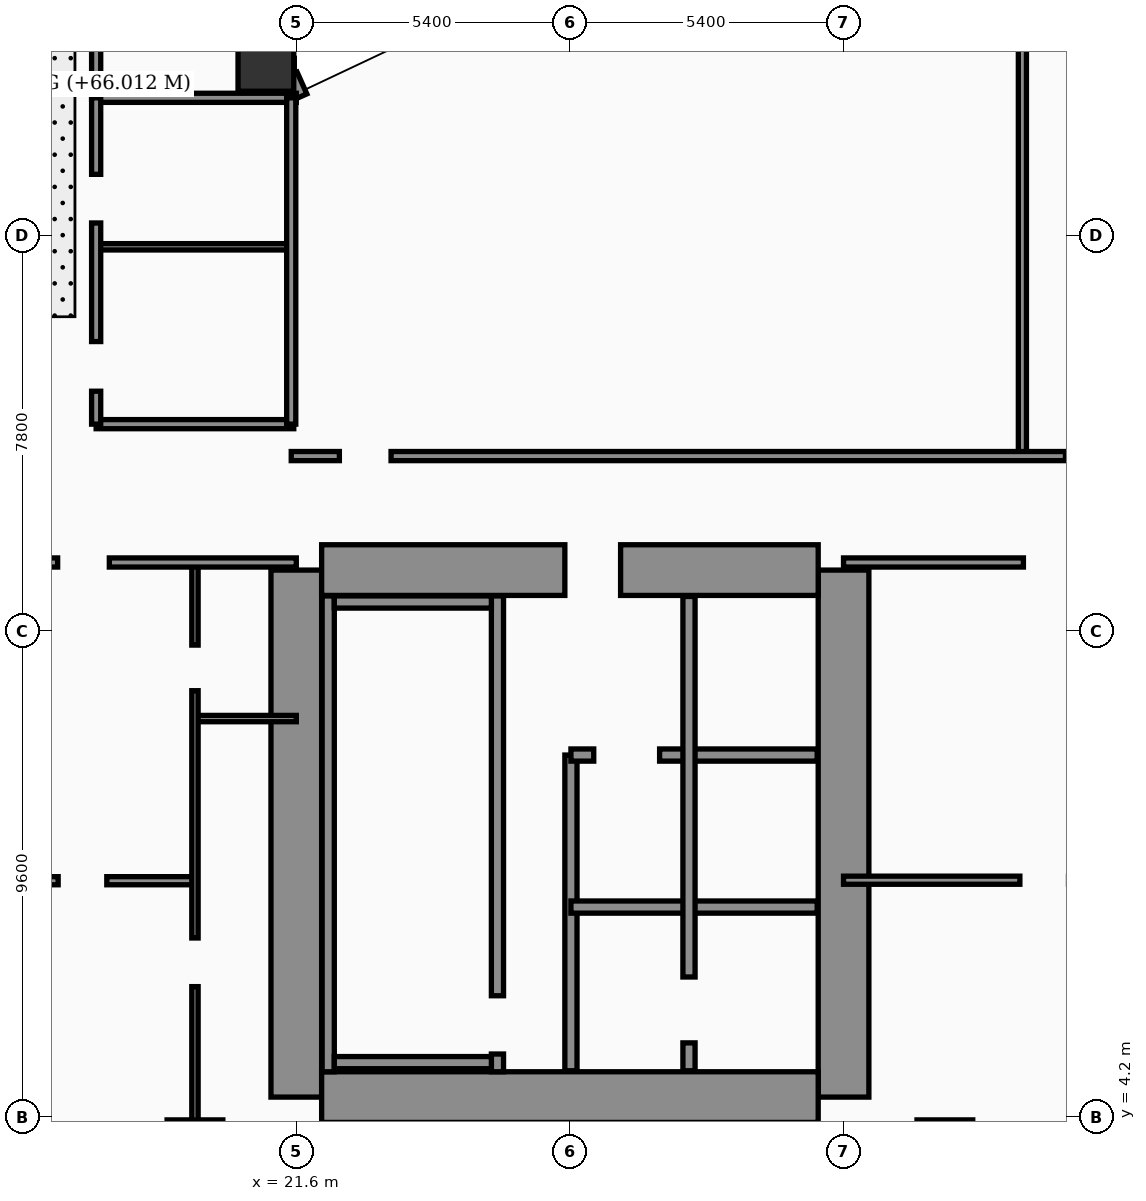
"""IFC4 building model, lengths in metres.
Left out: names, types, materials, properties, quantities, classifications, styles, units other than length and angle.
Written with IfcOpenShell. Run it as: python <this file> out.ifc"""

import sys

from ifc_helpers import new_model, si_unit, direction, frame, frame_2d, origin, origin_2d, place, context, subcontext, project, spatial, rectangle, hollow_rectangle, extrude, element, fill, save


model = new_model("IFC4")
c1 = context("Model", 3, precision=1e-05, world=origin(), true_north=direction((0.0, 1.0)))
c2 = subcontext(c1, "Body", "Model", "MODEL_VIEW")
j1 = project(units=[si_unit("LENGTHUNIT", "METRE"), si_unit("PLANEANGLEUNIT", "RADIAN")], contexts=[c1])
p1 = place(None, origin())
s1 = spatial("IfcSite", under=j1, at=p1, CompositionType="ELEMENT")
p2 = place(p1, origin())
s2 = spatial("IfcBuilding", under=s1, at=p2, CompositionType="ELEMENT")
p3 = place(p2, frame((0.0, 0.0, 66.0)))
s3 = spatial("IfcBuildingStorey", under=s2, at=p3, CompositionType="ELEMENT", Elevation=66.0)
for number, where, z_axis, x_axis in (
    (1, (21.6, 4.6, 0.0), (0.0, 0.0, 1.0), (0.0, 1.0, 0.0)),
    (2, (32.4, 4.6, 0.0), (0.0, 0.0, 1.0), (0.0, 1.0, 0.0)),
):
    element("IfcWall", number, at=place(p3, frame(where, z_axis=z_axis, x_axis=x_axis)), inside=s3, PredefinedType="SHEAR", context=c2, shape_type="SweptSolid", body=[
        extrude(rectangle(XDim=10.4, YDim=1.0, at=frame_2d((5.2, 0.0))), origin(), (0.0, 0.0, 1.0), 3.56),
    ])
p4 = place(p3, frame((22.1, 15.0, 0.0), z_axis=(0.0, 0.0, 1.0), x_axis=(1.0, 0.0, 0.0)))
e3 = element("IfcWall", 3, at=p4, inside=s3, PredefinedType="SHEAR", context=c2, shape_type="SweptSolid", body=[
    extrude(rectangle(XDim=9.8, YDim=1.0, at=frame_2d((4.9, 0.0))), origin(), (0.0, 0.0, 1.0), 3.56),
])
p5 = place(p4, frame((4.8, 0.0, 0.0)))
e4 = element("IfcOpeningElement", 4, at=p5, cuts=e3, PredefinedType="OPENING", context=c2, shape_type="SweptSolid", body=[
    extrude(rectangle(XDim=1.1, YDim=2.2, at=frame_2d((0.55, 1.1))), frame((0.0, 0.51, 0.0), z_axis=(0.0, -1.0, 0.0), x_axis=(1.0, 0.0, 0.0)), (0.0, 0.0, 1.0), 1.02),
])
p6 = place(p3, frame((22.1, 4.6, 0.0), z_axis=(0.0, 0.0, 1.0), x_axis=(1.0, 0.0, 0.0)))
e5 = element("IfcWall", 5, at=p6, inside=s3, PredefinedType="SHEAR", context=c2, shape_type="SweptSolid", body=[
    extrude(rectangle(XDim=9.8, YDim=1.0, at=frame_2d((4.9, 0.0))), origin(), (0.0, 0.0, 1.0), 3.56),
])
p7 = place(p3, frame((22.23, 5.1, 0.0), z_axis=(0.0, 0.0, 1.0), x_axis=(0.0, 1.0, 0.0)))
e6 = element("IfcWall", 6, at=p7, inside=s3, PredefinedType="SOLIDWALL", context=c2, shape_type="SweptSolid", body=[
    extrude(rectangle(XDim=9.39, YDim=0.24, at=frame_2d((4.695, 0.0))), origin(), (0.0, 0.0, 1.0), 3.56),
])
p8 = place(p3, frame((25.57, 5.1, 0.0), z_axis=(0.0, 0.0, 1.0), x_axis=(0.0, 1.0, 0.0)))
e7 = element("IfcWall", 7, at=p8, inside=s3, PredefinedType="SOLIDWALL", context=c2, shape_type="SweptSolid", body=[
    extrude(rectangle(XDim=9.39, YDim=0.24, at=frame_2d((4.695, 0.0))), origin(), (0.0, 0.0, 1.0), 3.56),
])
p9 = place(p8, frame((0.35, 0.0, 0.0)))
e8 = element("IfcOpeningElement", 8, at=p9, cuts=e7, PredefinedType="OPENING", context=c2, shape_type="SweptSolid", body=[
    extrude(rectangle(XDim=1.15, YDim=2.2, at=frame_2d((0.575, 1.1))), frame((0.0, 0.13, 0.0), z_axis=(0.0, -1.0, 0.0), x_axis=(1.0, 0.0, 0.0)), (0.0, 0.0, 1.0), 0.26),
])
for number, where, z_axis, x_axis in (
    (9, (22.35, 5.28, 0.0), (0.0, 0.0, 1.0), (1.0, 0.0, 0.0)),
    (10, (22.35, 14.37, 0.0), (0.0, 0.0, 1.0), (1.0, 0.0, 0.0)),
):
    element("IfcWall", number, at=place(p3, frame(where, z_axis=z_axis, x_axis=x_axis)), inside=s3, PredefinedType="SOLIDWALL", context=c2, shape_type="SweptSolid", body=[
        extrude(rectangle(XDim=3.1, YDim=0.24, at=frame_2d((1.55, 0.0))), origin(), (0.0, 0.0, 1.0), 3.56),
    ])
for number, where, z_axis, x_axis in (
    (11, (21.0, 25.0, 0.0), (0.0, 0.0, 1.0), (1.0, 0.0, 0.0)),
    (12, (19.6, 3.6, 0.0), (0.0, 0.0, 1.0), (1.0, 0.0, 0.0)),
    (13, (34.4, 3.6, 0.0), (0.0, 0.0, 1.0), (1.0, 0.0, 0.0)),
):
    element("IfcColumn", number, at=place(p3, frame(where, z_axis=z_axis, x_axis=x_axis)), inside=s3, PredefinedType="COLUMN", context=c2, shape_type="SweptSolid", body=[
        extrude(hollow_rectangle(XDim=1.1, YDim=1.1, WallThickness=0.045, at=origin_2d()), origin(), (0.0, 0.0, 1.0), 3.56),
    ])
p10 = place(p3, frame((21.68, 24.34, 0.0), z_axis=(0.0, 0.0, 1.0), x_axis=(-0.40758134973, 0.913168901875, 0.0)))
e14 = element("IfcWall", 14, at=p10, inside=s3, PredefinedType="SOLIDWALL", context=c2, shape_type="SweptSolid", body=[
    extrude(rectangle(XDim=0.471, YDim=0.28, at=frame_2d((0.235, 0.0))), origin(), (0.0, 0.0, 1.0), 3.56),
])
p11 = place(p3, frame((27.02, 5.12, 0.0), z_axis=(0.0, 0.0, 1.0), x_axis=(0.0, 1.0, 0.0)))
e15 = element("IfcWall", 15, at=p11, inside=s3, PredefinedType="SOLIDWALL", context=c2, shape_type="SweptSolid", body=[
    extrude(rectangle(XDim=6.23, YDim=0.24, at=frame_2d((3.115, 0.0))), origin(), (0.0, 0.0, 1.0), 3.56),
])
p12 = place(p3, frame((27.02, 11.35, 0.0), z_axis=(0.0, 0.0, 1.0), x_axis=(1.0, 0.0, 0.0)))
e16 = element("IfcWall", 16, at=p12, inside=s3, PredefinedType="SOLIDWALL", context=c2, shape_type="SweptSolid", body=[
    extrude(rectangle(XDim=4.86, YDim=0.24, at=frame_2d((2.43, 0.0))), origin(), (0.0, 0.0, 1.0), 3.56),
])
p13 = place(p12, frame((0.45, 0.0, 0.0)))
e17 = element("IfcOpeningElement", 17, at=p13, cuts=e16, PredefinedType="OPENING", context=c2, shape_type="SweptSolid", body=[
    extrude(rectangle(XDim=1.3, YDim=2.35, at=frame_2d((0.65, 1.175))), frame((0.0, 0.13, 0.0), z_axis=(0.0, -1.0, 0.0), x_axis=(1.0, 0.0, 0.0)), (0.0, 0.0, 1.0), 0.26),
])
p14 = place(p3, frame((27.02, 8.35, 0.0), z_axis=(0.0, 0.0, 1.0), x_axis=(1.0, 0.0, 0.0)))
e18 = element("IfcWall", 18, at=p14, inside=s3, PredefinedType="SOLIDWALL", context=c2, shape_type="SweptSolid", body=[
    extrude(rectangle(XDim=4.86, YDim=0.24, at=frame_2d((2.43, 0.0))), origin(), (0.0, 0.0, 1.0), 3.56),
])
p15 = place(p3, frame((29.35, 5.12, 0.0), z_axis=(0.0, 0.0, 1.0), x_axis=(0.0, 1.0, 0.0)))
e19 = element("IfcWall", 19, at=p15, inside=s3, PredefinedType="SOLIDWALL", context=c2, shape_type="SweptSolid", body=[
    extrude(rectangle(XDim=9.36, YDim=0.24, at=frame_2d((4.68, 0.0))), origin(), (0.0, 0.0, 1.0), 3.56),
])
p16 = place(p15, frame((0.55, 0.0, 0.0)))
e20 = element("IfcOpeningElement", 20, at=p16, cuts=e19, PredefinedType="OPENING", context=c2, shape_type="SweptSolid", body=[
    extrude(rectangle(XDim=1.3, YDim=2.35, at=frame_2d((0.65, 1.175))), frame((0.0, 0.13, 0.0), z_axis=(0.0, -1.0, 0.0), x_axis=(1.0, 0.0, 0.0)), (0.0, 0.0, 1.0), 0.26),
])
p17 = place(p3, frame((19.6, 12.07, 0.0), z_axis=(0.0, 0.0, 1.0), x_axis=(1.0, 0.0, 0.0)))
e21 = element("IfcWall", 21, at=p17, inside=s3, PredefinedType="PARTITIONING", context=c2, shape_type="SweptSolid", body=[
    extrude(rectangle(XDim=2.0, YDim=0.125, at=frame_2d((1.0, 0.0))), origin(), (0.0, 0.0, 1.0), 3.56),
])
p18 = place(p3, frame((15.15, 8.87, 0.0), z_axis=(0.0, 0.0, 1.0), x_axis=(1.0, 0.0, 0.0)))
e22 = element("IfcWall", 22, at=p18, inside=s3, PredefinedType="PARTITIONING", context=c2, shape_type="SweptSolid", body=[
    extrude(rectangle(XDim=4.45, YDim=0.16, at=frame_2d((2.225, 0.0))), origin(), (0.0, 0.0, 1.0), 3.56),
])
p19 = place(p18, frame((1.75, 0.0, 0.0)))
e23 = element("IfcOpeningElement", 23, at=p19, cuts=e22, PredefinedType="OPENING", context=c2, shape_type="SweptSolid", body=[
    extrude(rectangle(XDim=0.96, YDim=2.2, at=frame_2d((0.48, 1.1))), frame((0.0, 0.09, 0.0), z_axis=(0.0, -1.0, 0.0), x_axis=(1.0, 0.0, 0.0)), (0.0, 0.0, 1.0), 0.18),
])
p20 = place(p3, frame((19.6, 2.44, 0.0), z_axis=(0.0, 0.0, 1.0), x_axis=(0.0, 1.0, 0.0)))
e24 = element("IfcWall", 24, at=p20, inside=s3, PredefinedType="PARTITIONING", context=c2, shape_type="SweptSolid", body=[
    extrude(rectangle(XDim=12.71, YDim=0.125, at=frame_2d((6.355, 0.0))), origin(), (0.0, 0.0, 1.0), 2.34),
])
p21 = place(p20, frame((4.34, 0.0, 0.0)))
e25 = element("IfcOpeningElement", 25, at=p21, cuts=e24, PredefinedType="OPENING", context=c2, shape_type="SweptSolid", body=[
    extrude(rectangle(XDim=0.96, YDim=2.2, at=frame_2d((0.48, 1.1))), frame((0.0, 0.073, 0.0), z_axis=(0.0, -1.0, 0.0), x_axis=(1.0, 0.0, 0.0)), (0.0, 0.0, 1.0), 0.145),
])
p22 = place(p20, frame((10.18, 0.0, 0.0)))
e26 = element("IfcOpeningElement", 26, at=p22, cuts=e24, PredefinedType="OPENING", context=c2, shape_type="SweptSolid", body=[
    extrude(rectangle(XDim=0.9, YDim=2.15, at=frame_2d((0.45, 1.075))), frame((0.0, 0.073, 0.0), z_axis=(0.0, -1.0, 0.0), x_axis=(1.0, 0.0, 0.0)), (0.0, 0.0, 1.0), 0.145),
])
p23 = place(p3, frame((15.15, 15.15, 0.0), z_axis=(0.0, 0.0, 1.0), x_axis=(1.0, 0.0, 0.0)))
e27 = element("IfcWall", 27, at=p23, inside=s3, PredefinedType="PARTITIONING", context=c2, shape_type="SweptSolid", body=[
    extrude(rectangle(XDim=6.45, YDim=0.18, at=frame_2d((3.225, 0.0))), origin(), (0.0, 0.0, 1.0), 2.34),
])
p24 = place(p23, frame((1.74, 0.0, 0.0)))
e28 = element("IfcOpeningElement", 28, at=p24, cuts=e27, PredefinedType="OPENING", context=c2, shape_type="SweptSolid", body=[
    extrude(rectangle(XDim=1.02, YDim=2.2, at=frame_2d((0.51, 1.1))), frame((0.0, 0.1, 0.0), z_axis=(0.0, -1.0, 0.0), x_axis=(1.0, 0.0, 0.0)), (0.0, 0.0, 1.0), 0.2),
])
p25 = place(p3, frame((17.65, 24.3, 0.0), z_axis=(0.0, 0.0, 1.0), x_axis=(0.0, 1.0, 0.0)))
e29 = element("IfcWall", 29, at=p25, inside=s3, PredefinedType="PARTITIONING", context=c2, shape_type="SweptSolid", body=[
    extrude(rectangle(XDim=16.4, YDim=0.18, at=frame_2d((8.2, 0.0))), origin(), (0.0, 0.0, 1.0), 2.84),
])
p26 = place(p3, frame((17.65, 17.88, 0.0), z_axis=(0.0, 0.0, 1.0), x_axis=(1.0, 0.0, 0.0)))
e30 = element("IfcWall", 30, at=p26, inside=s3, PredefinedType="PARTITIONING", context=c2, shape_type="SweptSolid", body=[
    extrude(rectangle(XDim=3.9, YDim=0.18, at=frame_2d((1.95, 0.0))), origin(), (0.0, 0.0, 1.0), 3.56),
])
p27 = place(p3, frame((17.65, 21.38, 0.0), z_axis=(0.0, 0.0, 1.0), x_axis=(1.0, 0.0, 0.0)))
e31 = element("IfcWall", 31, at=p27, inside=s3, PredefinedType="PARTITIONING", context=c2, shape_type="SweptSolid", body=[
    extrude(rectangle(XDim=3.9, YDim=0.125, at=frame_2d((1.95, 0.0))), origin(), (0.0, 0.0, 1.0), 3.09),
])
p28 = place(p3, frame((17.65, 24.32, 0.0), z_axis=(0.0, 0.0, 1.0), x_axis=(1.0, 0.0, 0.0)))
e32 = element("IfcWall", 32, at=p28, inside=s3, PredefinedType="PARTITIONING", context=c2, shape_type="SweptSolid", body=[
    extrude(rectangle(XDim=3.95, YDim=0.18, at=frame_2d((1.975, 0.0))), origin(), (0.0, 0.0, 1.0), 3.56),
])
p29 = place(p3, frame((21.5, 17.88, 0.0), z_axis=(0.0, 0.0, 1.0), x_axis=(0.0, 1.0, 0.0)))
e33 = element("IfcWall", 33, at=p29, inside=s3, PredefinedType="PARTITIONING", context=c2, shape_type="SweptSolid", body=[
    extrude(rectangle(XDim=6.44, YDim=0.18, at=frame_2d((3.22, 0.0))), origin(), (0.0, 0.0, 1.0), 3.09),
])
p30 = place(p3, frame((17.65, 17.88, 0.0), z_axis=(0.0, 0.0, 1.0), x_axis=(0.0, 1.0, 0.0)))
e34 = element("IfcWall", 34, at=p30, inside=s3, PredefinedType="PARTITIONING", context=c2, shape_type="SweptSolid", body=[
    extrude(rectangle(XDim=6.44, YDim=0.18, at=frame_2d((3.22, 0.0))), origin(), (0.0, 0.0, 1.0), 3.09),
])
p31 = place(p30, frame((0.65, 0.0, 0.0)))
e35 = element("IfcOpeningElement", 35, at=p31, cuts=e34, PredefinedType="OPENING", context=c2, shape_type="SweptSolid", body=[
    extrude(rectangle(XDim=0.98, YDim=2.15, at=frame_2d((0.49, 1.075))), frame((0.0, 0.1, 0.0), z_axis=(0.0, -1.0, 0.0), x_axis=(1.0, 0.0, 0.0)), (0.0, 0.0, 1.0), 0.2),
])
p32 = place(p30, frame((3.97, 0.0, 0.0)))
e36 = element("IfcOpeningElement", 36, at=p32, cuts=e34, PredefinedType="OPENING", context=c2, shape_type="SweptSolid", body=[
    extrude(rectangle(XDim=0.96, YDim=2.2, at=frame_2d((0.48, 1.1))), frame((0.0, 0.1, 0.0), z_axis=(0.0, -1.0, 0.0), x_axis=(1.0, 0.0, 0.0)), (0.0, 0.0, 1.0), 0.2),
])
p33 = place(p3, frame((32.4, 8.88, 0.0), z_axis=(0.0, 0.0, 1.0), x_axis=(1.0, 0.0, 0.0)))
e37 = element("IfcWall", 37, at=p33, inside=s3, PredefinedType="PARTITIONING", context=c2, shape_type="SweptSolid", body=[
    extrude(rectangle(XDim=7.92, YDim=0.16, at=frame_2d((3.96, 0.0))), origin(), (0.0, 0.0, 1.0), 2.84),
])
p34 = place(p33, frame((3.48, 0.0, 0.0)))
e38 = element("IfcOpeningElement", 38, at=p34, cuts=e37, PredefinedType="OPENING", context=c2, shape_type="SweptSolid", body=[
    extrude(rectangle(XDim=0.96, YDim=2.2, at=frame_2d((0.48, 1.1))), frame((0.0, 0.09, 0.0), z_axis=(0.0, -1.0, 0.0), x_axis=(1.0, 0.0, 0.0)), (0.0, 0.0, 1.0), 0.18),
])
p35 = place(p3, frame((32.4, 15.15, 0.0), z_axis=(0.0, 0.0, 1.0), x_axis=(1.0, 0.0, 0.0)))
e39 = element("IfcWall", 39, at=p35, inside=s3, PredefinedType="PARTITIONING", context=c2, shape_type="SweptSolid", body=[
    extrude(rectangle(XDim=18.9, YDim=0.18, at=frame_2d((9.45, 0.0))), origin(), (0.0, 0.0, 1.0), 2.84),
])
p36 = place(p35, frame((3.55, 0.0, 0.0)))
e40 = element("IfcOpeningElement", 40, at=p36, cuts=e39, PredefinedType="OPENING", context=c2, shape_type="SweptSolid", body=[
    extrude(rectangle(XDim=1.02, YDim=2.2, at=frame_2d((0.51, 1.1))), frame((0.0, 0.1, 0.0), z_axis=(0.0, -1.0, 0.0), x_axis=(1.0, 0.0, 0.0)), (0.0, 0.0, 1.0), 0.2),
])
p37 = place(p35, frame((12.9, 0.0, 0.0)))
e41 = element("IfcOpeningElement", 41, at=p37, cuts=e39, PredefinedType="OPENING", context=c2, shape_type="SweptSolid", body=[
    extrude(rectangle(XDim=1.02, YDim=2.2, at=frame_2d((0.51, 1.1))), frame((0.0, 0.1, 0.0), z_axis=(0.0, -1.0, 0.0), x_axis=(1.0, 0.0, 0.0)), (0.0, 0.0, 1.0), 0.2),
])
p38 = place(p3, frame((35.93, 17.25, 0.0), z_axis=(0.0, 0.0, 1.0), x_axis=(0.0, 1.0, 0.0)))
e42 = element("IfcWall", 42, at=p38, inside=s3, PredefinedType="PARTITIONING", context=c2, shape_type="SweptSolid", body=[
    extrude(rectangle(XDim=14.0, YDim=0.16, at=frame_2d((7.0, 0.0))), origin(), (0.0, 0.0, 1.0), 2.84),
])
p39 = place(p3, frame((21.5, 17.25, 0.0), z_axis=(0.0, 0.0, 1.0), x_axis=(1.0, 0.0, 0.0)))
e43 = element("IfcWall", 43, at=p39, inside=s3, PredefinedType="PARTITIONING", context=c2, shape_type="SweptSolid", body=[
    extrude(rectangle(XDim=27.45, YDim=0.18, at=frame_2d((13.725, 0.0))), origin(), (0.0, 0.0, 1.0), 2.84),
])
p40 = place(p39, frame((0.95, 0.0, 0.0)))
e44 = element("IfcOpeningElement", 44, at=p40, cuts=e43, PredefinedType="OPENING", context=c2, shape_type="SweptSolid", body=[
    extrude(rectangle(XDim=1.02, YDim=2.2, at=frame_2d((0.51, 1.1))), frame((0.0, 0.1, 0.0), z_axis=(0.0, -1.0, 0.0), x_axis=(1.0, 0.0, 0.0)), (0.0, 0.0, 1.0), 0.2),
])
p41 = place(p39, frame((15.28, 0.0, 0.0)))
e45 = element("IfcOpeningElement", 45, at=p41, cuts=e43, PredefinedType="OPENING", context=c2, shape_type="SweptSolid", body=[
    extrude(rectangle(XDim=1.02, YDim=2.2, at=frame_2d((0.51, 1.1))), frame((0.0, 0.1, 0.0), z_axis=(0.0, -1.0, 0.0), x_axis=(1.0, 0.0, 0.0)), (0.0, 0.0, 1.0), 0.2),
])
p42 = place(p13, origin())
e46 = element("IfcDoor", 46, at=p42, inside=s3, OperationType="DOUBLE_DOOR_SLIDING", PredefinedType="DOOR", context=c2, shape_type="SweptSolid", body=[
    extrude(rectangle(XDim=1.3, YDim=2.35, at=frame_2d((0.65, 1.175))), frame((0.0, 0.025, 0.0), z_axis=(0.0, -1.0, 0.0), x_axis=(1.0, 0.0, 0.0)), (0.0, 0.0, 1.0), 0.05),
])
fill(e17, e46)
p43 = place(p16, origin())
e47 = element("IfcDoor", 47, at=p43, inside=s3, OperationType="DOUBLE_DOOR_SLIDING", PredefinedType="DOOR", context=c2, shape_type="SweptSolid", body=[
    extrude(rectangle(XDim=1.3, YDim=2.35, at=frame_2d((0.65, 1.175))), frame((0.0, 0.025, 0.0), z_axis=(0.0, -1.0, 0.0), x_axis=(1.0, 0.0, 0.0)), (0.0, 0.0, 1.0), 0.05),
])
fill(e20, e47)
p44 = place(p19, origin())
e48 = element("IfcDoor", 48, at=p44, inside=s3, OperationType="SINGLE_SWING_LEFT", PredefinedType="DOOR", context=c2, shape_type="SweptSolid", body=[
    extrude(rectangle(XDim=0.96, YDim=2.2, at=frame_2d((0.48, 1.1))), frame((0.0, 0.025, 0.0), z_axis=(0.0, -1.0, 0.0), x_axis=(1.0, 0.0, 0.0)), (0.0, 0.0, 1.0), 0.05),
])
fill(e23, e48)
p45 = place(p21, origin())
e49 = element("IfcDoor", 49, at=p45, inside=s3, OperationType="SINGLE_SWING_LEFT", PredefinedType="DOOR", context=c2, shape_type="SweptSolid", body=[
    extrude(rectangle(XDim=0.96, YDim=2.2, at=frame_2d((0.48, 1.1))), frame((0.0, 0.025, 0.0), z_axis=(0.0, -1.0, 0.0), x_axis=(1.0, 0.0, 0.0)), (0.0, 0.0, 1.0), 0.05),
])
fill(e25, e49)
p46 = place(p22, origin())
e50 = element("IfcDoor", 50, at=p46, inside=s3, OperationType="SINGLE_SWING_RIGHT", PredefinedType="DOOR", context=c2, shape_type="SweptSolid", body=[
    extrude(rectangle(XDim=0.9, YDim=2.15, at=frame_2d((0.45, 1.075))), frame((0.0, 0.025, 0.0), z_axis=(0.0, -1.0, 0.0), x_axis=(1.0, 0.0, 0.0)), (0.0, 0.0, 1.0), 0.05),
])
fill(e26, e50)
p47 = place(p24, origin())
e51 = element("IfcDoor", 51, at=p47, inside=s3, OperationType="SINGLE_SWING_LEFT", PredefinedType="DOOR", context=c2, shape_type="SweptSolid", body=[
    extrude(rectangle(XDim=1.02, YDim=2.2, at=frame_2d((0.51, 1.1))), frame((0.0, 0.025, 0.0), z_axis=(0.0, -1.0, 0.0), x_axis=(1.0, 0.0, 0.0)), (0.0, 0.0, 1.0), 0.05),
])
fill(e28, e51)
p48 = place(p31, origin())
e52 = element("IfcDoor", 52, at=p48, inside=s3, OperationType="SINGLE_SWING_LEFT", PredefinedType="DOOR", context=c2, shape_type="SweptSolid", body=[
    extrude(rectangle(XDim=0.98, YDim=2.15, at=frame_2d((0.49, 1.075))), frame((0.0, 0.025, 0.0), z_axis=(0.0, -1.0, 0.0), x_axis=(1.0, 0.0, 0.0)), (0.0, 0.0, 1.0), 0.05),
])
fill(e35, e52)
p49 = place(p32, origin())
e53 = element("IfcDoor", 53, at=p49, inside=s3, OperationType="SINGLE_SWING_RIGHT", PredefinedType="DOOR", context=c2, shape_type="SweptSolid", body=[
    extrude(rectangle(XDim=0.96, YDim=2.2, at=frame_2d((0.48, 1.1))), frame((0.0, 0.025, 0.0), z_axis=(0.0, -1.0, 0.0), x_axis=(1.0, 0.0, 0.0)), (0.0, 0.0, 1.0), 0.05),
])
fill(e36, e53)
p50 = place(p34, origin())
e54 = element("IfcDoor", 54, at=p50, inside=s3, OperationType="SINGLE_SWING_LEFT", PredefinedType="DOOR", context=c2, shape_type="SweptSolid", body=[
    extrude(rectangle(XDim=0.96, YDim=2.2, at=frame_2d((0.48, 1.1))), frame((0.0, 0.025, 0.0), z_axis=(0.0, -1.0, 0.0), x_axis=(1.0, 0.0, 0.0)), (0.0, 0.0, 1.0), 0.05),
])
fill(e38, e54)
p51 = place(p36, origin())
e55 = element("IfcDoor", 55, at=p51, inside=s3, OperationType="SINGLE_SWING_LEFT", PredefinedType="DOOR", context=c2, shape_type="SweptSolid", body=[
    extrude(rectangle(XDim=1.02, YDim=2.2, at=frame_2d((0.51, 1.1))), frame((0.0, 0.025, 0.0), z_axis=(0.0, -1.0, 0.0), x_axis=(1.0, 0.0, 0.0)), (0.0, 0.0, 1.0), 0.05),
])
fill(e40, e55)
p52 = place(p40, origin())
e56 = element("IfcDoor", 56, at=p52, inside=s3, OperationType="SINGLE_SWING_RIGHT", PredefinedType="DOOR", context=c2, shape_type="SweptSolid", body=[
    extrude(rectangle(XDim=1.02, YDim=2.2, at=frame_2d((0.51, 1.1))), frame((0.0, 0.025, 0.0), z_axis=(0.0, -1.0, 0.0), x_axis=(1.0, 0.0, 0.0)), (0.0, 0.0, 1.0), 0.05),
])
fill(e44, e56)
p53 = place(p41, origin())
e57 = element("IfcDoor", 57, at=p53, inside=s3, OperationType="SINGLE_SWING_LEFT", PredefinedType="DOOR", context=c2, shape_type="SweptSolid", body=[
    extrude(rectangle(XDim=1.02, YDim=2.2, at=frame_2d((0.51, 1.1))), frame((0.0, 0.025, 0.0), z_axis=(0.0, -1.0, 0.0), x_axis=(1.0, 0.0, 0.0)), (0.0, 0.0, 1.0), 0.05),
])
fill(e45, e57)
p54 = place(p9, origin())
e58 = element("IfcDoor", 58, at=p54, inside=s3, OperationType="SINGLE_SWING_RIGHT", PredefinedType="DOOR", context=c2, shape_type="SweptSolid", body=[
    extrude(rectangle(XDim=1.15, YDim=2.2, at=frame_2d((0.575, 1.1))), frame((0.0, 0.025, 0.0), z_axis=(0.0, -1.0, 0.0), x_axis=(1.0, 0.0, 0.0)), (0.0, 0.0, 1.0), 0.05),
])
fill(e8, e58)
p55 = place(p5, origin())
e59 = element("IfcDoor", 59, at=p55, inside=s3, OperationType="SINGLE_SWING_LEFT", PredefinedType="DOOR", context=c2, shape_type="SweptSolid", body=[
    extrude(rectangle(XDim=1.1, YDim=2.2, at=frame_2d((0.55, 1.1))), frame((0.0, 0.025, 0.0), z_axis=(0.0, -1.0, 0.0), x_axis=(1.0, 0.0, 0.0)), (0.0, 0.0, 1.0), 0.05),
])
fill(e4, e59)
save(model, sys.argv[1])
